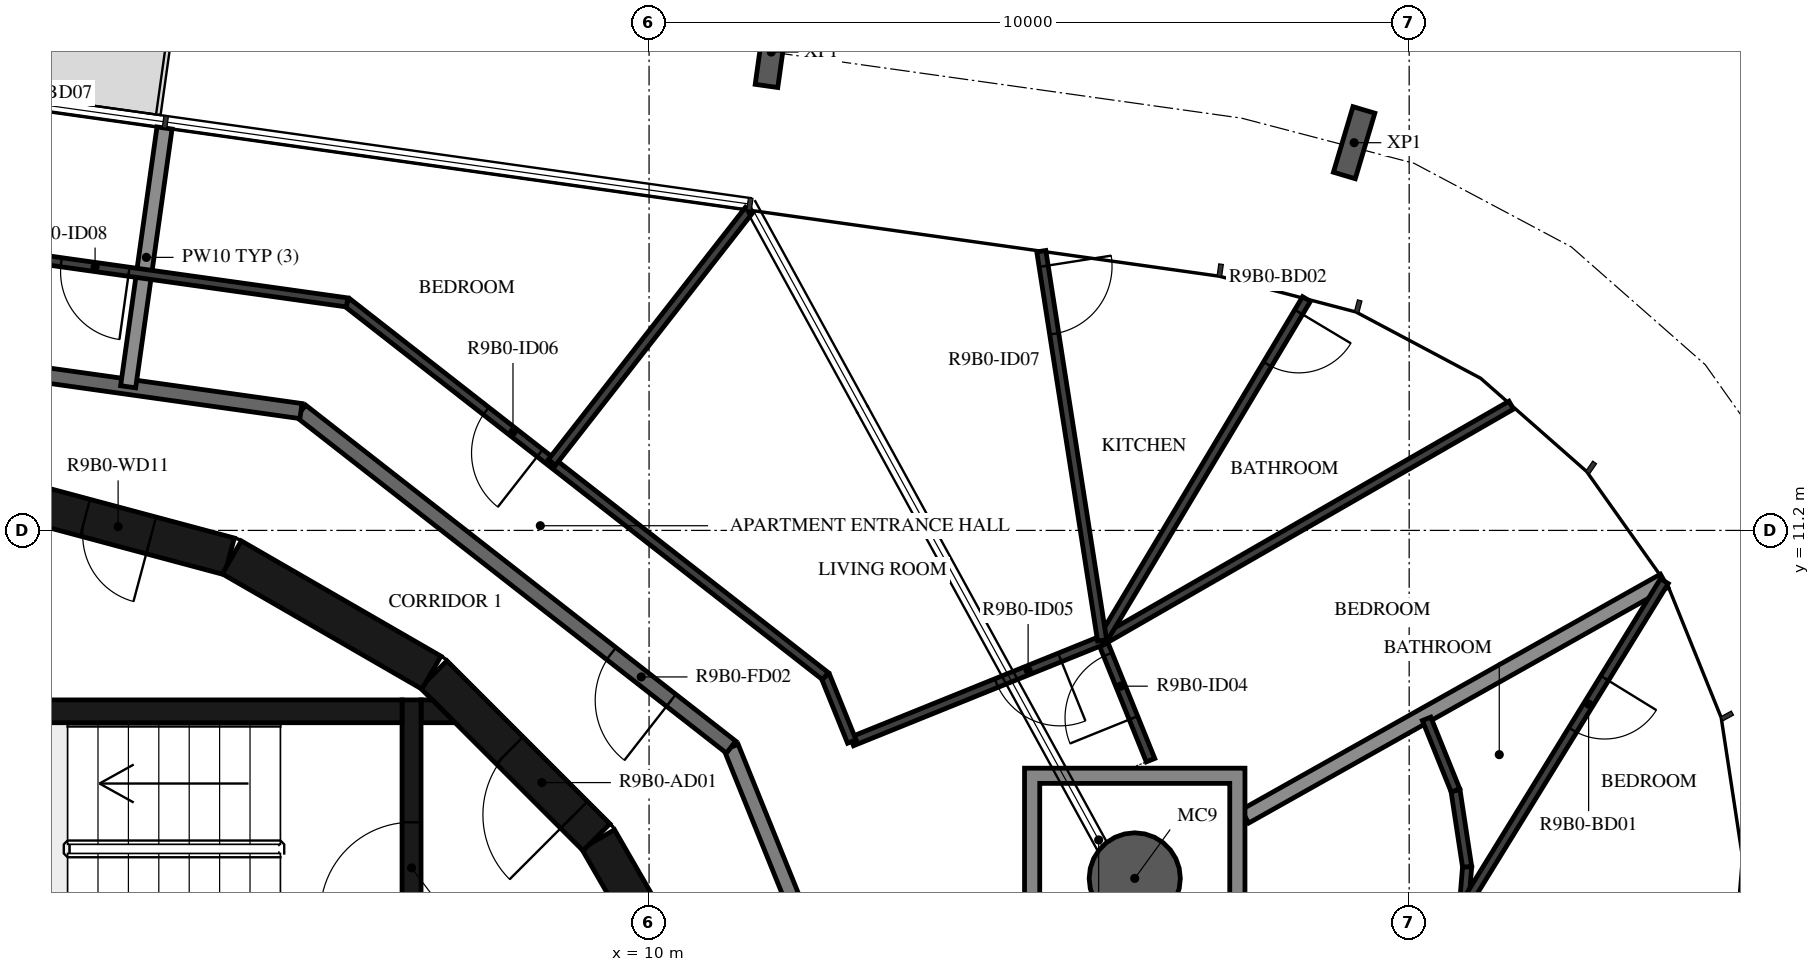
"""IFC4 building model, lengths in metres.
Left out: names, types, materials, properties, quantities, classifications, styles, units other than length and angle.
Written with IfcOpenShell. Run it as: python <this file> out.ifc"""

import sys

from ifc_helpers import new_model, si_unit, direction, frame, frame_2d, origin, origin_2d, place, context, subcontext, project, spatial, polyline, rectangle, hollow_circle, i_section, outline, extrude, element, fill, save


model = new_model("IFC4")
c1 = context("Model", 3, precision=1e-05, world=origin(), true_north=direction((0.0, 1.0)))
c2 = subcontext(c1, "Body", "Model", "MODEL_VIEW")
j1 = project(units=[si_unit("LENGTHUNIT", "METRE"), si_unit("PLANEANGLEUNIT", "RADIAN")], contexts=[c1])
p1 = place(None, origin())
s1 = spatial("IfcSite", under=j1, at=p1, CompositionType="ELEMENT")
p2 = place(p1, origin())
s2 = spatial("IfcBuilding", under=s1, at=p2, CompositionType="ELEMENT")
p3 = place(p2, frame((0.0, 0.0, 347.0)))
s3 = spatial("IfcBuildingStorey", under=s2, at=p3, CompositionType="ELEMENT", Elevation=347.0)
p4 = place(p3, frame((16.39, 6.622, -0.38), z_axis=(0.0, 0.0, 1.0), x_axis=(1.0, 0.0, 0.0)))
e1 = element("IfcColumn", 1, at=p4, inside=s3, PredefinedType="COLUMN", context=c2, shape_type="SweptSolid", body=[
    extrude(hollow_circle(Radius=0.6, WallThickness=0.03, at=origin_2d()), origin(), (0.0, 0.0, 1.0), 3.5),
])
for number, where, z_axis, x_axis in (
    (2, (19.276, 16.301, -0.38), (0.0, 0.0, 1.0), (0.958, -0.286, 0.0)),
    (3, (11.607, 17.493, -0.38), (0.0, 0.0, 1.0), (0.99, -0.139, 0.0)),
):
    element("IfcColumn", number, at=place(p3, frame(where, z_axis=z_axis, x_axis=x_axis)), inside=s3, PredefinedType="COLUMN", context=c2, shape_type="SweptSolid", body=[
        extrude(i_section(OverallWidth=0.3, OverallDepth=0.9, WebThickness=0.019, FlangeThickness=0.035, FilletRadius=0.03, at=origin_2d()), origin(), (0.0, 0.0, 1.0), 3.5),
    ])
p5 = place(p3, frame((10.845, 4.51, 0.0), z_axis=(0.0, 0.0, 1.0), x_axis=(-0.500087131594, 0.865975092491, 0.0)))
e4 = element("IfcWall", 4, at=p5, inside=s3, PredefinedType="SHEAR", context=c2, shape_type="SweptSolid", body=[
    extrude(rectangle(XDim=3.033, YDim=0.5, at=frame_2d((1.516, 0.0))), origin(), (0.0, 0.0, 1.0), 3.12),
])
p6 = place(p3, frame((9.308, 7.164, 0.0), z_axis=(0.0, 0.0, 1.0), x_axis=(-0.707106781187, 0.707106781187, 0.0)))
e5 = element("IfcWall", 5, at=p6, inside=s3, PredefinedType="SHEAR", context=c2, shape_type="SweptSolid", body=[
    extrude(rectangle(XDim=3.032, YDim=0.5, at=frame_2d((1.516, 0.0))), origin(), (0.0, 0.0, 1.0), 3.12),
])
p7 = place(p6, frame((0.416, 0.0, 0.0)))
e6 = element("IfcOpeningElement", 6, at=p7, cuts=e5, PredefinedType="OPENING", context=c2, shape_type="SweptSolid", body=[
    extrude(rectangle(XDim=1.2, YDim=2.1, at=frame_2d((0.6, 1.05))), frame((0.0, 0.26, 0.0), z_axis=(0.0, -1.0, 0.0), x_axis=(1.0, 0.0, 0.0)), (0.0, 0.0, 1.0), 0.52),
])
p8 = place(p3, frame((7.137, 9.329, 0.0), z_axis=(0.0, 0.0, 1.0), x_axis=(-0.865975092491, 0.500087131594, 0.0)))
e7 = element("IfcWall", 7, at=p8, inside=s3, PredefinedType="SHEAR", context=c2, shape_type="SweptSolid", body=[
    extrude(rectangle(XDim=3.033, YDim=0.5, at=frame_2d((1.516, 0.0))), origin(), (0.0, 0.0, 1.0), 3.12),
])
p9 = place(p3, frame((4.479, 10.858, 0.0), z_axis=(0.0, 0.0, 1.0), x_axis=(-0.965948410781, 0.258734743916, 0.0)))
e8 = element("IfcWall", 8, at=p9, inside=s3, PredefinedType="SHEAR", context=c2, shape_type="SweptSolid", body=[
    extrude(rectangle(XDim=3.033, YDim=0.5, at=frame_2d((1.516, 0.0))), origin(), (0.0, 0.0, 1.0), 3.12),
])
p10 = place(p9, frame((1.066, 0.0, 0.0)))
e9 = element("IfcOpeningElement", 9, at=p10, cuts=e8, PredefinedType="OPENING", context=c2, shape_type="SweptSolid", body=[
    extrude(rectangle(XDim=0.9, YDim=2.1, at=frame_2d((0.45, 1.05))), frame((0.0, 0.26, 0.0), z_axis=(0.0, -1.0, 0.0), x_axis=(1.0, 0.0, 0.0)), (0.0, 0.0, 1.0), 0.52),
])
p11 = place(p3, frame((0.0, 8.82, 0.0), z_axis=(0.0, 0.0, 1.0), x_axis=(1.0, 0.0, 0.0)))
e10 = element("IfcWall", 10, at=p11, inside=s3, PredefinedType="SHEAR", context=c2, shape_type="SweptSolid", body=[
    extrude(rectangle(XDim=6.75, YDim=0.3, at=frame_2d((3.375, 0.0))), origin(), (0.0, 0.0, 1.0), 3.12),
])
p12 = place(p3, frame((6.875, 5.05, 0.0), z_axis=(0.0, 0.0, 1.0), x_axis=(0.0, 1.0, 0.0)))
e11 = element("IfcWall", 11, at=p12, inside=s3, PredefinedType="SHEAR", context=c2, shape_type="SweptSolid", body=[
    extrude(rectangle(XDim=3.92, YDim=0.25, at=frame_2d((1.96, 0.0))), origin(), (0.0, 0.0, 1.0), 3.12),
])
p13 = place(p12, frame((1.11, 0.0, 0.0)))
e12 = element("IfcOpeningElement", 12, at=p13, cuts=e11, PredefinedType="OPENING", context=c2, shape_type="SweptSolid", body=[
    extrude(rectangle(XDim=1.2, YDim=2.1, at=frame_2d((0.6, 1.05))), frame((0.0, 0.135, 0.0), z_axis=(0.0, -1.0, 0.0), x_axis=(1.0, 0.0, 0.0)), (0.0, 0.0, 1.0), 0.27),
])
p14 = place(p3, origin())
e13 = element("IfcWall", 13, at=p14, inside=s3, PredefinedType="SHEAR", context=c2, shape_type="SweptSolid", body=[
    extrude(outline(polyline([(7.448, 8.67), (7.0, 8.67), (7.0, 8.97), (7.148, 8.97), (7.448, 8.67)])), origin(), (0.0, 0.0, 1.0), 3.12),
])
p15 = place(p3, frame((13.769, 1.691, 0.0), z_axis=(0.0, 0.0, 1.0), x_axis=(-0.374618189599, 0.92717916932, 0.0)))
e14 = element("IfcWall", 14, at=p15, inside=s3, PredefinedType="STANDARD", context=c2, shape_type="SweptSolid", body=[
    extrude(rectangle(XDim=7.181, YDim=0.2, at=frame_2d((3.591, 0.0))), origin(), (0.0, 0.0, 1.0), 3.12),
])
p16 = place(p15, frame((2.371, 0.0, 0.0)))
e15 = element("IfcOpeningElement", 15, at=p16, cuts=e14, PredefinedType="OPENING", context=c2, shape_type="SweptSolid", body=[
    extrude(rectangle(XDim=1.0, YDim=2.1, at=frame_2d((0.5, 1.05))), frame((0.0, 0.11, 0.0), z_axis=(0.0, -1.0, 0.0), x_axis=(1.0, 0.0, 0.0)), (0.0, 0.0, 1.0), 0.22),
])
p17 = place(p3, frame((11.079, 8.349, 0.0), z_axis=(0.0, 0.0, 1.0), x_axis=(-0.78800478687, 0.615669112324, 0.0)))
e16 = element("IfcWall", 16, at=p17, inside=s3, PredefinedType="STANDARD", context=c2, shape_type="SweptSolid", body=[
    extrude(rectangle(XDim=7.181, YDim=0.2, at=frame_2d((3.591, 0.0))), origin(), (0.0, 0.0, 1.0), 3.12),
])
p18 = place(p17, frame((1.0, 0.0, 0.0)))
e17 = element("IfcOpeningElement", 17, at=p18, cuts=e16, PredefinedType="OPENING", context=c2, shape_type="SweptSolid", body=[
    extrude(rectangle(XDim=1.0, YDim=2.1, at=frame_2d((0.5, 1.05))), frame((0.0, 0.11, 0.0), z_axis=(0.0, -1.0, 0.0), x_axis=(1.0, 0.0, 0.0)), (0.0, 0.0, 1.0), 0.22),
])
p19 = place(p3, frame((5.42, 12.77, 0.0), z_axis=(0.0, 0.0, 1.0), x_axis=(-0.990270565508, 0.139155334385, 0.0)))
e18 = element("IfcWall", 18, at=p19, inside=s3, PredefinedType="STANDARD", context=c2, shape_type="SweptSolid", body=[
    extrude(rectangle(XDim=7.181, YDim=0.2, at=frame_2d((3.59, 0.0))), origin(), (0.0, 0.0, 1.0), 3.12),
])
p20 = place(p3, frame((23.354, 10.537, 0.0), z_axis=(0.0, 0.0, 1.0), x_axis=(-0.871719790551, -0.490004700754, 0.0)))
e19 = element("IfcWall", 19, at=p20, inside=s3, PredefinedType="STANDARD", context=c2, shape_type="SweptSolid", body=[
    extrude(rectangle(XDim=6.326, YDim=0.2, at=frame_2d((3.163, 0.0))), origin(), (0.0, 0.0, 1.0), 2.73),
])
p21 = place(p3, frame((3.625, 16.494, 0.0), z_axis=(0.0, 0.0, 1.0), x_axis=(-0.139174320859, -0.990267897295, 0.0)))
e20 = element("IfcWall", 20, at=p21, inside=s3, PredefinedType="STANDARD", context=c2, shape_type="SweptSolid", body=[
    extrude(rectangle(XDim=3.438, YDim=0.2, at=frame_2d((1.719, 0.0))), origin(), (0.0, 0.0, 1.0), 2.73),
])
p22 = place(p3, frame((20.762, 6.775, 0.0), z_axis=(0.0, 0.0, 1.0), x_axis=(-0.08121587, -0.996696534789, 0.0)))
e21 = element("IfcWall", 21, at=p22, inside=s3, PredefinedType="PARTITIONING", context=c2, shape_type="SweptSolid", body=[
    extrude(rectangle(XDim=1.016, YDim=0.12, at=frame_2d((0.508, 0.0))), origin(), (0.0, 0.0, 1.0), 3.12),
])
p23 = place(p3, frame((23.357, 10.532, 0.0), z_axis=(0.0, 0.0, 1.0), x_axis=(-0.524476563806, -0.851424884542, 0.0)))
e22 = element("IfcWall", 22, at=p23, inside=s3, PredefinedType="PARTITIONING", context=c2, shape_type="SweptSolid", body=[
    extrude(rectangle(XDim=5.029, YDim=0.12, at=frame_2d((2.515, 0.0))), origin(), (0.0, 0.0, 1.0), 3.12),
])
p24 = place(p23, frame((1.5, 0.0, 0.0)))
e23 = element("IfcOpeningElement", 23, at=p24, cuts=e22, PredefinedType="OPENING", context=c2, shape_type="SweptSolid", body=[
    extrude(rectangle(XDim=0.8, YDim=2.1, at=frame_2d((0.4, 1.05))), frame((0.0, 0.07, 0.0), z_axis=(0.0, -1.0, 0.0), x_axis=(1.0, 0.0, 0.0)), (0.0, 0.0, 1.0), 0.14),
])
p25 = place(p3, frame((20.762, 6.775, 0.0), z_axis=(0.0, 0.0, 1.0), x_axis=(-0.150702440861, 0.988579169474, 0.0)))
e24 = element("IfcWall", 24, at=p25, inside=s3, PredefinedType="PARTITIONING", context=c2, shape_type="SweptSolid", body=[
    extrude(rectangle(XDim=1.016, YDim=0.12, at=frame_2d((0.508, 0.0))), origin(), (0.0, 0.0, 1.0), 3.12),
])
p26 = place(p3, frame((20.609, 7.779, 0.0), z_axis=(0.0, 0.0, 1.0), x_axis=(-0.374371668856, 0.927278735633, 0.0)))
e25 = element("IfcWall", 25, at=p26, inside=s3, PredefinedType="PARTITIONING", context=c2, shape_type="SweptSolid", body=[
    extrude(rectangle(XDim=1.016, YDim=0.12, at=frame_2d((0.508, 0.0))), origin(), (0.0, 0.0, 1.0), 3.12),
])
p27 = place(p3, frame((16.597, 8.177, 0.0), z_axis=(0.0, 0.0, 1.0), x_axis=(-0.374631609957, 0.927173746835, 0.0)))
e26 = element("IfcWall", 26, at=p27, inside=s3, PredefinedType="PARTITIONING", context=c2, shape_type="SweptSolid", body=[
    extrude(rectangle(XDim=1.7, YDim=0.12, at=frame_2d((0.85, 0.0))), origin(), (0.0, 0.0, 1.0), 3.12),
])
p28 = place(p27, frame((0.6, 0.0, 0.0)))
e27 = element("IfcOpeningElement", 27, at=p28, cuts=e26, PredefinedType="OPENING", context=c2, shape_type="SweptSolid", body=[
    extrude(rectangle(XDim=0.9, YDim=2.1, at=frame_2d((0.45, 1.05))), frame((0.0, 0.07, 0.0), z_axis=(0.0, -1.0, 0.0), x_axis=(1.0, 0.0, 0.0)), (0.0, 0.0, 1.0), 0.14),
])
p29 = place(p3, frame((15.96, 9.753, 0.0), z_axis=(0.0, 0.0, 1.0), x_axis=(-0.927148174805, -0.37469489182, 0.0)))
e28 = element("IfcWall", 28, at=p29, inside=s3, PredefinedType="PARTITIONING", context=c2, shape_type="SweptSolid", body=[
    extrude(rectangle(XDim=3.552, YDim=0.12, at=frame_2d((1.776, 0.0))), origin(), (0.0, 0.0, 1.0), 3.12),
])
p30 = place(p29, frame((0.6, 0.0, 0.0)))
e29 = element("IfcOpeningElement", 29, at=p30, cuts=e28, PredefinedType="OPENING", context=c2, shape_type="SweptSolid", body=[
    extrude(rectangle(XDim=0.9, YDim=2.1, at=frame_2d((0.45, 1.05))), frame((0.0, 0.07, 0.0), z_axis=(0.0, -1.0, 0.0), x_axis=(1.0, 0.0, 0.0)), (0.0, 0.0, 1.0), 0.14),
])
p31 = place(p3, frame((12.667, 8.423, 0.0), z_axis=(0.0, 0.0, 1.0), x_axis=(-0.374697807675, 0.927146996395, 0.0)))
e30 = element("IfcWall", 30, at=p31, inside=s3, PredefinedType="PARTITIONING", context=c2, shape_type="SweptSolid", body=[
    extrude(rectangle(XDim=0.928, YDim=0.12, at=frame_2d((0.464, 0.0))), origin(), (0.0, 0.0, 1.0), 3.12),
])
p32 = place(p3, frame((12.319, 9.283, 0.0), z_axis=(0.0, 0.0, 1.0), x_axis=(-0.788000268464, 0.61567489546, 0.0)))
e31 = element("IfcWall", 31, at=p32, inside=s3, PredefinedType="PARTITIONING", context=c2, shape_type="SweptSolid", body=[
    extrude(rectangle(XDim=7.985, YDim=0.12, at=frame_2d((3.992, 0.0))), origin(), (0.0, 0.0, 1.0), 3.12),
])
p33 = place(p32, frame((4.765, 0.0, 0.0)))
e32 = element("IfcOpeningElement", 32, at=p33, cuts=e31, PredefinedType="OPENING", context=c2, shape_type="SweptSolid", body=[
    extrude(rectangle(XDim=0.9, YDim=2.1, at=frame_2d((0.45, 1.05))), frame((0.0, 0.07, 0.0), z_axis=(0.0, -1.0, 0.0), x_axis=(1.0, 0.0, 0.0)), (0.0, 0.0, 1.0), 0.14),
])
p34 = place(p3, frame((6.027, 14.199, 0.0), z_axis=(0.0, 0.0, 1.0), x_axis=(-0.990271593532, 0.139148018469, 0.0)))
e33 = element("IfcWall", 33, at=p34, inside=s3, PredefinedType="PARTITIONING", context=c2, shape_type="SweptSolid", body=[
    extrude(rectangle(XDim=7.985, YDim=0.12, at=frame_2d((3.992, 0.0))), origin(), (0.0, 0.0, 1.0), 3.12),
])
p35 = place(p34, frame((2.898, 0.0, 0.0)))
e34 = element("IfcOpeningElement", 34, at=p35, cuts=e33, PredefinedType="OPENING", context=c2, shape_type="SweptSolid", body=[
    extrude(rectangle(XDim=0.9, YDim=2.1, at=frame_2d((0.45, 1.05))), frame((0.0, 0.07, 0.0), z_axis=(0.0, -1.0, 0.0), x_axis=(1.0, 0.0, 0.0)), (0.0, 0.0, 1.0), 0.14),
])
p36 = place(p3, frame((21.343, 12.847, 0.0), z_axis=(0.0, 0.0, 1.0), x_axis=(-0.866974691568, -0.498352168832, 0.0)))
e35 = element("IfcWall", 35, at=p36, inside=s3, PredefinedType="PARTITIONING", context=c2, shape_type="SweptSolid", body=[
    extrude(rectangle(XDim=6.208, YDim=0.12, at=frame_2d((3.104, 0.0))), origin(), (0.0, 0.0, 1.0), 3.12),
])
p37 = place(p3, frame((18.649, 14.244, 0.0), z_axis=(0.0, 0.0, 1.0), x_axis=(-0.513782200586, -0.85792065505, 0.0)))
e36 = element("IfcWall", 36, at=p37, inside=s3, PredefinedType="PARTITIONING", context=c2, shape_type="SweptSolid", body=[
    extrude(rectangle(XDim=5.234, YDim=0.12, at=frame_2d((2.617, 0.0))), origin(), (0.0, 0.0, 1.0), 3.12),
])
p38 = place(p37, frame((0.2, 0.0, 0.0)))
e37 = element("IfcOpeningElement", 37, at=p38, cuts=e36, PredefinedType="OPENING", context=c2, shape_type="SweptSolid", body=[
    extrude(rectangle(XDim=0.8, YDim=2.1, at=frame_2d((0.4, 1.05))), frame((0.0, 0.07, 0.0), z_axis=(0.0, -1.0, 0.0), x_axis=(1.0, 0.0, 0.0)), (0.0, 0.0, 1.0), 0.14),
])
p39 = place(p3, frame((15.16, 14.873, 0.0), z_axis=(0.0, 0.0, 1.0), x_axis=(0.154389815045, -0.988010012606, 0.0)))
e38 = element("IfcWall", 38, at=p39, inside=s3, PredefinedType="PARTITIONING", context=c2, shape_type="SweptSolid", body=[
    extrude(rectangle(XDim=5.182, YDim=0.12, at=frame_2d((2.591, 0.0))), origin(), (0.0, 0.0, 1.0), 3.12),
])
p40 = place(p39, frame((0.2, 0.0, 0.0)))
e39 = element("IfcOpeningElement", 39, at=p40, cuts=e38, PredefinedType="OPENING", context=c2, shape_type="SweptSolid", body=[
    extrude(rectangle(XDim=0.9, YDim=2.1, at=frame_2d((0.45, 1.05))), frame((0.0, 0.07, 0.0), z_axis=(0.0, -1.0, 0.0), x_axis=(1.0, 0.0, 0.0)), (0.0, 0.0, 1.0), 0.14),
])
p41 = place(p3, frame((11.315, 15.414, 0.0), z_axis=(0.0, 0.0, 1.0), x_axis=(-0.615656413137, -0.788014708596, 0.0)))
e40 = element("IfcWall", 40, at=p41, inside=s3, PredefinedType="PARTITIONING", context=c2, shape_type="SweptSolid", body=[
    extrude(rectangle(XDim=4.213, YDim=0.12, at=frame_2d((2.106, 0.0))), origin(), (0.0, 0.0, 1.0), 3.12),
])
p42 = place(p3, origin())
e41 = element("IfcWall", 41, at=p42, inside=s3, PredefinedType="STANDARD", context=c2, shape_type="SweptSolid", body=[
    extrude(outline(polyline([(17.84, 8.072), (17.84, 5.172), (14.94, 5.172), (14.94, 8.072), (17.84, 8.072)]), holes=[polyline([(15.14, 5.372), (17.64, 5.372), (17.64, 7.872), (15.14, 7.872), (15.14, 5.372)])]), origin(), (0.0, 0.0, 1.0), 3.12),
])
p43 = place(p13, origin())
e42 = element("IfcDoor", 42, at=p43, inside=s3, OperationType="SINGLE_SWING_LEFT", PredefinedType="DOOR", context=c2, shape_type="SweptSolid", body=[
    extrude(rectangle(XDim=1.2, YDim=2.1, at=frame_2d((0.6, 1.05))), frame((0.0, 0.025, 0.0), z_axis=(0.0, -1.0, 0.0), x_axis=(1.0, 0.0, 0.0)), (0.0, 0.0, 1.0), 0.05),
])
fill(e12, e42)
p44 = place(p7, origin())
e43 = element("IfcDoor", 43, at=p44, inside=s3, OperationType="SINGLE_SWING_RIGHT", PredefinedType="DOOR", context=c2, shape_type="SweptSolid", body=[
    extrude(rectangle(XDim=1.2, YDim=2.1, at=frame_2d((0.6, 1.05))), frame((0.0, 0.025, 0.0), z_axis=(0.0, -1.0, 0.0), x_axis=(1.0, 0.0, 0.0)), (0.0, 0.0, 1.0), 0.05),
])
fill(e6, e43)
p45 = place(p10, origin())
e44 = element("IfcDoor", 44, at=p45, inside=s3, OperationType="SINGLE_SWING_LEFT", PredefinedType="DOOR", context=c2, shape_type="SweptSolid", body=[
    extrude(rectangle(XDim=0.9, YDim=2.1, at=frame_2d((0.45, 1.05))), frame((0.0, 0.025, 0.0), z_axis=(0.0, -1.0, 0.0), x_axis=(1.0, 0.0, 0.0)), (0.0, 0.0, 1.0), 0.05),
])
fill(e9, e44)
p46 = place(p24, origin())
e45 = element("IfcDoor", 45, at=p46, inside=s3, OperationType="SINGLE_SWING_RIGHT", PredefinedType="DOOR", context=c2, shape_type="SweptSolid", body=[
    extrude(rectangle(XDim=0.8, YDim=2.1, at=frame_2d((0.4, 1.05))), frame((0.0, 0.025, 0.0), z_axis=(0.0, -1.0, 0.0), x_axis=(1.0, 0.0, 0.0)), (0.0, 0.0, 1.0), 0.05),
])
fill(e23, e45)
p47 = place(p18, origin())
e46 = element("IfcDoor", 46, at=p47, inside=s3, OperationType="SINGLE_SWING_LEFT", PredefinedType="DOOR", context=c2, shape_type="SweptSolid", body=[
    extrude(rectangle(XDim=1.0, YDim=2.1, at=frame_2d((0.5, 1.05))), frame((0.0, 0.025, 0.0), z_axis=(0.0, -1.0, 0.0), x_axis=(1.0, 0.0, 0.0)), (0.0, 0.0, 1.0), 0.05),
])
fill(e17, e46)
p48 = place(p28, origin())
e47 = element("IfcDoor", 47, at=p48, inside=s3, OperationType="SINGLE_SWING_LEFT", PredefinedType="DOOR", context=c2, shape_type="SweptSolid", body=[
    extrude(rectangle(XDim=0.9, YDim=2.1, at=frame_2d((0.45, 1.05))), frame((0.0, 0.025, 0.0), z_axis=(0.0, -1.0, 0.0), x_axis=(1.0, 0.0, 0.0)), (0.0, 0.0, 1.0), 0.05),
])
fill(e27, e47)
p49 = place(p30, origin())
e48 = element("IfcDoor", 48, at=p49, inside=s3, OperationType="SINGLE_SWING_RIGHT", PredefinedType="DOOR", context=c2, shape_type="SweptSolid", body=[
    extrude(rectangle(XDim=0.9, YDim=2.1, at=frame_2d((0.45, 1.05))), frame((0.0, 0.025, 0.0), z_axis=(0.0, -1.0, 0.0), x_axis=(1.0, 0.0, 0.0)), (0.0, 0.0, 1.0), 0.05),
])
fill(e29, e48)
p50 = place(p33, origin())
e49 = element("IfcDoor", 49, at=p50, inside=s3, OperationType="SINGLE_SWING_LEFT", PredefinedType="DOOR", context=c2, shape_type="SweptSolid", body=[
    extrude(rectangle(XDim=0.9, YDim=2.1, at=frame_2d((0.45, 1.05))), frame((0.0, 0.025, 0.0), z_axis=(0.0, -1.0, 0.0), x_axis=(1.0, 0.0, 0.0)), (0.0, 0.0, 1.0), 0.05),
])
fill(e32, e49)
p51 = place(p40, origin())
e50 = element("IfcDoor", 50, at=p51, inside=s3, OperationType="SINGLE_SWING_LEFT", PredefinedType="DOOR", context=c2, shape_type="SweptSolid", body=[
    extrude(rectangle(XDim=0.9, YDim=2.1, at=frame_2d((0.45, 1.05))), frame((0.0, 0.025, 0.0), z_axis=(0.0, -1.0, 0.0), x_axis=(1.0, 0.0, 0.0)), (0.0, 0.0, 1.0), 0.05),
])
fill(e39, e50)
p52 = place(p38, origin())
e51 = element("IfcDoor", 51, at=p52, inside=s3, OperationType="SINGLE_SWING_LEFT", PredefinedType="DOOR", context=c2, shape_type="SweptSolid", body=[
    extrude(rectangle(XDim=0.8, YDim=2.1, at=frame_2d((0.4, 1.05))), frame((0.0, 0.025, 0.0), z_axis=(0.0, -1.0, 0.0), x_axis=(1.0, 0.0, 0.0)), (0.0, 0.0, 1.0), 0.05),
])
fill(e37, e51)
p53 = place(p35, origin())
e52 = element("IfcDoor", 52, at=p53, inside=s3, OperationType="SINGLE_SWING_LEFT", PredefinedType="DOOR", context=c2, shape_type="SweptSolid", body=[
    extrude(rectangle(XDim=0.9, YDim=2.1, at=frame_2d((0.45, 1.05))), frame((0.0, 0.025, 0.0), z_axis=(0.0, -1.0, 0.0), x_axis=(1.0, 0.0, 0.0)), (0.0, 0.0, 1.0), 0.05),
])
fill(e34, e52)
save(model, sys.argv[1])
